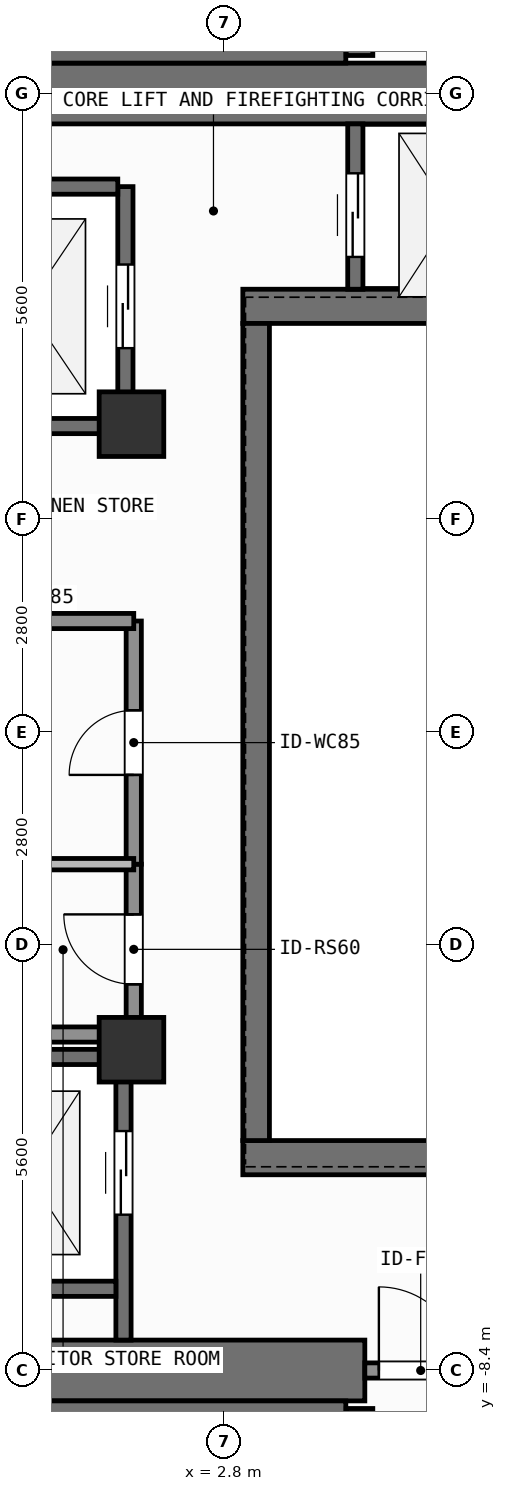
"""IFC4 building model, lengths in metres.
Left out: names, types, materials, properties, quantities, classifications, styles, units other than length and angle.
Written with IfcOpenShell. Run it as: python <this file> out.ifc"""

import sys

from ifc_helpers import new_model, si_unit, direction, frame, frame_2d, origin, origin_2d, place, context, subcontext, project, spatial, rectangle, extrude, element, fill, save


model = new_model("IFC4")
c1 = context("Model", 3, precision=1e-05, world=origin(), true_north=direction((0.0, 1.0)))
c2 = subcontext(c1, "Body", "Model", "MODEL_VIEW")
j1 = project(units=[si_unit("LENGTHUNIT", "METRE"), si_unit("PLANEANGLEUNIT", "RADIAN")], contexts=[c1])
p1 = place(None, origin())
s1 = spatial("IfcSite", under=j1, at=p1, CompositionType="ELEMENT")
p2 = place(p1, origin())
s2 = spatial("IfcBuilding", under=s1, at=p2, CompositionType="ELEMENT")
p3 = place(p2, frame((0.0, 0.0, 179.7)))
s3 = spatial("IfcBuildingStorey", under=s2, at=p3, CompositionType="ELEMENT", Elevation=179.7)
p4 = place(p3, frame((-2.62, -8.4, 0.0), z_axis=(0.0, 0.0, 1.0), x_axis=(1.0, 0.0, 0.0)))
e1 = element("IfcWall", 1, at=p4, inside=s3, PredefinedType="SHEAR", context=c2, shape_type="SweptSolid", body=[
    extrude(rectangle(XDim=7.27, YDim=0.8, at=frame_2d((3.635, 0.0))), origin(), (0.0, 0.0, 1.0), 3.9),
])
p5 = place(p3, frame((-7.55, 8.4, 0.0), z_axis=(0.0, 0.0, 1.0), x_axis=(1.0, 0.0, 0.0)))
e2 = element("IfcWall", 2, at=p5, inside=s3, PredefinedType="SHEAR", context=c2, shape_type="SweptSolid", body=[
    extrude(rectangle(XDim=16.35, YDim=0.8, at=frame_2d((8.175, 0.0))), origin(), (0.0, 0.0, 1.0), 3.9),
])
for number, where, z_axis, x_axis in (
    (3, (3.045, -5.6, 0.0), (0.0, 0.0, 1.0), (1.0, 0.0, 0.0)),
    (4, (3.045, 5.6, 0.0), (0.0, 0.0, 1.0), (1.0, 0.0, 0.0)),
):
    element("IfcWall", number, at=place(p3, frame(where, z_axis=z_axis, x_axis=x_axis)), inside=s3, PredefinedType="SHEAR", context=c2, shape_type="SweptSolid", body=[
        extrude(rectangle(XDim=5.755, YDim=0.45, at=frame_2d((2.877, 0.0))), origin(), (0.0, 0.0, 1.0), 3.9),
    ])
p6 = place(p3, frame((3.22, -5.375, 0.0), z_axis=(0.0, 0.0, 1.0), x_axis=(0.0, 1.0, 0.0)))
e5 = element("IfcWall", 5, at=p6, inside=s3, PredefinedType="SHEAR", context=c2, shape_type="SweptSolid", body=[
    extrude(rectangle(XDim=10.75, YDim=0.35, at=frame_2d((5.375, 0.0))), origin(), (0.0, 0.0, 1.0), 3.9),
])
p7 = place(p3, frame((-2.2, -8.913, 0.0), z_axis=(0.0, 0.0, 1.0), x_axis=(1.0, 0.0, 0.0)))
e6 = element("IfcWall", 6, at=p7, inside=s3, PredefinedType="SHEAR", context=c2, shape_type="SweptSolid", body=[
    extrude(rectangle(XDim=6.6, YDim=0.225, at=frame_2d((3.3, 0.0))), origin(), (0.0, 0.0, 1.0), 3.9),
])
p8 = place(p3, frame((4.58, -8.9, 0.0), z_axis=(0.0, 0.0, 1.0), x_axis=(0.0, -1.0, 0.0)))
e7 = element("IfcWall", 7, at=p8, inside=s3, PredefinedType="SHEAR", context=c2, shape_type="SweptSolid", body=[
    extrude(rectangle(XDim=2.925, YDim=0.35, at=frame_2d((1.462, 0.0))), origin(), (0.0, 0.0, 1.0), 3.9),
])
p9 = place(p8, frame((0.913, 0.0, 0.0)))
e8 = element("IfcOpeningElement", 8, at=p9, cuts=e7, PredefinedType="OPENING", context=c2, shape_type="SweptSolid", body=[
    extrude(rectangle(XDim=1.1, YDim=2.15, at=frame_2d((0.55, 1.075))), frame((0.0, 0.185, 0.0), z_axis=(0.0, -1.0, 0.0), x_axis=(1.0, 0.0, 0.0)), (0.0, 0.0, 1.0), 0.37),
])
p10 = place(p3, frame((-2.2, 8.913, 0.0), z_axis=(0.0, 0.0, 1.0), x_axis=(1.0, 0.0, 0.0)))
e9 = element("IfcWall", 9, at=p10, inside=s3, PredefinedType="SHEAR", context=c2, shape_type="SweptSolid", body=[
    extrude(rectangle(XDim=6.6, YDim=0.225, at=frame_2d((3.3, 0.0))), origin(), (0.0, 0.0, 1.0), 3.9),
])
p11 = place(p3, frame((4.58, 11.825, 0.0), z_axis=(0.0, 0.0, 1.0), x_axis=(0.0, -1.0, 0.0)))
e10 = element("IfcWall", 10, at=p11, inside=s3, PredefinedType="SHEAR", context=c2, shape_type="SweptSolid", body=[
    extrude(rectangle(XDim=2.925, YDim=0.35, at=frame_2d((1.462, 0.0))), origin(), (0.0, 0.0, 1.0), 3.9),
])
p12 = place(p11, frame((0.913, 0.0, 0.0)))
e11 = element("IfcOpeningElement", 11, at=p12, cuts=e10, PredefinedType="OPENING", context=c2, shape_type="SweptSolid", body=[
    extrude(rectangle(XDim=1.1, YDim=2.15, at=frame_2d((0.55, 1.075))), frame((0.0, 0.185, 0.0), z_axis=(0.0, -1.0, 0.0), x_axis=(1.0, 0.0, 0.0)), (0.0, 0.0, 1.0), 0.37),
])
for number, where, z_axis, x_axis in (
    (12, (1.58, -4.18, 0.0), (0.0, 0.0, 1.0), (1.0, 0.0, 0.0)),
    (13, (1.58, 4.05, 0.0), (0.0, 0.0, 1.0), (1.0, 0.0, 0.0)),
):
    element("IfcColumn", number, at=place(p3, frame(where, z_axis=z_axis, x_axis=x_axis)), inside=s3, PredefinedType="COLUMN", context=c2, shape_type="SweptSolid", body=[
        extrude(rectangle(XDim=0.85, YDim=0.85, at=origin_2d()), origin(), (0.0, 0.0, 1.0), 3.9),
    ])
p13 = place(p3, frame((1.5, 4.025, 0.0), z_axis=(0.0, 0.0, 1.0), x_axis=(0.0, 1.0, 0.0)))
e14 = element("IfcWall", 14, at=p13, inside=s3, PredefinedType="SHEAR", context=c2, shape_type="SweptSolid", body=[
    extrude(rectangle(XDim=3.15, YDim=0.2, at=frame_2d((1.575, 0.0))), origin(), (0.0, 0.0, 1.0), 3.68),
])
p14 = place(p13, frame((1.025, 0.0, 0.0)))
e15 = element("IfcOpeningElement", 15, at=p14, cuts=e14, PredefinedType="OPENING", context=c2, shape_type="SweptSolid", body=[
    extrude(rectangle(XDim=1.1, YDim=2.2, at=frame_2d((0.55, 1.1))), frame((0.0, 0.11, 0.0), z_axis=(0.0, -1.0, 0.0), x_axis=(1.0, 0.0, 0.0)), (0.0, 0.0, 1.0), 0.22),
])
for number, where, z_axis, x_axis in (
    (16, (-1.0, 4.025, 0.0), (0.0, 0.0, 1.0), (1.0, 0.0, 0.0)),
    (17, (-1.0, 7.175, 0.0), (0.0, 0.0, 1.0), (1.0, 0.0, 0.0)),
):
    element("IfcWall", number, at=place(p3, frame(where, z_axis=z_axis, x_axis=x_axis)), inside=s3, PredefinedType="SHEAR", context=c2, shape_type="SweptSolid", body=[
        extrude(rectangle(XDim=2.4, YDim=0.2, at=frame_2d((1.2, 0.0))), origin(), (0.0, 0.0, 1.0), 3.68),
    ])
p15 = place(p3, frame((1.475, -8.0, 0.0), z_axis=(0.0, 0.0, 1.0), x_axis=(0.0, 1.0, 0.0)))
e18 = element("IfcWall", 18, at=p15, inside=s3, PredefinedType="SHEAR", context=c2, shape_type="SweptSolid", body=[
    extrude(rectangle(XDim=3.725, YDim=0.2, at=frame_2d((1.863, 0.0))), origin(), (0.0, 0.0, 1.0), 3.68),
])
p16 = place(p15, frame((1.65, 0.0, 0.0)))
e19 = element("IfcOpeningElement", 19, at=p16, cuts=e18, PredefinedType="OPENING", context=c2, shape_type="SweptSolid", body=[
    extrude(rectangle(XDim=1.1, YDim=2.2, at=frame_2d((0.55, 1.1))), frame((0.0, 0.11, 0.0), z_axis=(0.0, -1.0, 0.0), x_axis=(1.0, 0.0, 0.0)), (0.0, 0.0, 1.0), 0.22),
])
for number, where, z_axis, x_axis in (
    (20, (-0.975, -7.325, 0.0), (0.0, 0.0, 1.0), (1.0, 0.0, 0.0)),
    (21, (-0.975, -4.275, 0.0), (0.0, 0.0, 1.0), (1.0, 0.0, 0.0)),
):
    element("IfcWall", number, at=place(p3, frame(where, z_axis=z_axis, x_axis=x_axis)), inside=s3, PredefinedType="SHEAR", context=c2, shape_type="SweptSolid", body=[
        extrude(rectangle(XDim=2.35, YDim=0.2, at=frame_2d((1.175, 0.0))), origin(), (0.0, 0.0, 1.0), 3.68),
    ])
p17 = place(p3, frame((4.525, 5.825, 0.0), z_axis=(0.0, 0.0, 1.0), x_axis=(0.0, 1.0, 0.0)))
e22 = element("IfcWall", 22, at=p17, inside=s3, PredefinedType="SHEAR", context=c2, shape_type="SweptSolid", body=[
    extrude(rectangle(XDim=2.175, YDim=0.2, at=frame_2d((1.087, 0.0))), origin(), (0.0, 0.0, 1.0), 3.68),
])
p18 = place(p17, frame((0.425, 0.0, 0.0)))
e23 = element("IfcOpeningElement", 23, at=p18, cuts=e22, PredefinedType="OPENING", context=c2, shape_type="SweptSolid", body=[
    extrude(rectangle(XDim=1.1, YDim=2.2, at=frame_2d((0.55, 1.1))), frame((0.0, 0.11, 0.0), z_axis=(0.0, -1.0, 0.0), x_axis=(1.0, 0.0, 0.0)), (0.0, 0.0, 1.0), 0.22),
])
p19 = place(p3, frame((4.65, -8.4, 0.0), z_axis=(0.0, 0.0, 1.0), x_axis=(1.0, 0.0, 0.0)))
e24 = element("IfcWall", 24, at=p19, inside=s3, PredefinedType="SOLIDWALL", context=c2, shape_type="SweptSolid", body=[
    extrude(rectangle(XDim=1.47, YDim=0.2, at=frame_2d((0.735, 0.0))), origin(), (0.0, 0.0, 1.0), 2.82),
])
p20 = place(p19, frame((0.185, 0.0, 0.0)))
e25 = element("IfcOpeningElement", 25, at=p20, cuts=e24, PredefinedType="OPENING", context=c2, shape_type="SweptSolid", body=[
    extrude(rectangle(XDim=1.1, YDim=2.15, at=frame_2d((0.55, 1.075))), frame((0.0, 0.11, 0.0), z_axis=(0.0, -1.0, 0.0), x_axis=(1.0, 0.0, 0.0)), (0.0, 0.0, 1.0), 0.22),
])
p21 = place(p3, frame((1.61, -3.98, 0.0), z_axis=(0.0, 0.0, 1.0), x_axis=(0.0, 1.0, 0.0)))
e26 = element("IfcWall", 26, at=p21, inside=s3, PredefinedType="SOLIDWALL", context=c2, shape_type="SweptSolid", body=[
    extrude(rectangle(XDim=2.241, YDim=0.2, at=frame_2d((1.121, 0.0))), origin(), (0.0, 0.0, 1.0), 3.68),
])
p22 = place(p21, frame((0.66, 0.0, 0.0)))
e27 = element("IfcOpeningElement", 27, at=p22, cuts=e26, PredefinedType="OPENING", context=c2, shape_type="SweptSolid", body=[
    extrude(rectangle(XDim=0.92, YDim=2.1, at=frame_2d((0.46, 1.05))), frame((0.0, 0.11, 0.0), z_axis=(0.0, -1.0, 0.0), x_axis=(1.0, 0.0, 0.0)), (0.0, 0.0, 1.0), 0.22),
])
p23 = place(p3, frame((1.61, -1.739, 0.0), z_axis=(0.0, 0.0, 1.0), x_axis=(0.0, 1.0, 0.0)))
e28 = element("IfcWall", 28, at=p23, inside=s3, PredefinedType="SOLIDWALL", context=c2, shape_type="SweptSolid", body=[
    extrude(rectangle(XDim=3.199, YDim=0.2, at=frame_2d((1.6, 0.0))), origin(), (0.0, 0.0, 1.0), 3.68),
])
p24 = place(p23, frame((1.175, 0.0, 0.0)))
e29 = element("IfcOpeningElement", 29, at=p24, cuts=e28, PredefinedType="OPENING", context=c2, shape_type="SweptSolid", body=[
    extrude(rectangle(XDim=0.85, YDim=2.1, at=frame_2d((0.425, 1.05))), frame((0.0, 0.11, 0.0), z_axis=(0.0, -1.0, 0.0), x_axis=(1.0, 0.0, 0.0)), (0.0, 0.0, 1.0), 0.22),
])
for number, where, z_axis, x_axis in (
    (30, (-1.58, -3.98, 0.0), (0.0, 0.0, 1.0), (1.0, 0.0, 0.0)),
    (31, (-1.58, 1.46, 0.0), (0.0, 0.0, 1.0), (1.0, 0.0, 0.0)),
):
    element("IfcWall", number, at=place(p3, frame(where, z_axis=z_axis, x_axis=x_axis)), inside=s3, PredefinedType="SOLIDWALL", context=c2, shape_type="SweptSolid", body=[
        extrude(rectangle(XDim=3.19, YDim=0.2, at=frame_2d((1.595, 0.0))), origin(), (0.0, 0.0, 1.0), 3.68),
    ])
p25 = place(p3, frame((-1.58, -1.739, 0.0), z_axis=(0.0, 0.0, 1.0), x_axis=(1.0, 0.0, 0.0)))
e32 = element("IfcWall", 32, at=p25, inside=s3, PredefinedType="PARTITIONING", context=c2, shape_type="SweptSolid", body=[
    extrude(rectangle(XDim=3.19, YDim=0.15, at=frame_2d((1.595, 0.0))), origin(), (0.0, 0.0, 1.0), 3.68),
])
p26 = place(p14, origin())
e33 = element("IfcDoor", 33, at=p26, inside=s3, OperationType="SLIDING_TO_LEFT", PredefinedType="DOOR", context=c2, shape_type="SweptSolid", body=[
    extrude(rectangle(XDim=1.1, YDim=2.2, at=frame_2d((0.55, 1.1))), frame((0.0, 0.025, 0.0), z_axis=(0.0, -1.0, 0.0), x_axis=(1.0, 0.0, 0.0)), (0.0, 0.0, 1.0), 0.05),
])
fill(e15, e33)
p27 = place(p16, origin())
e34 = element("IfcDoor", 34, at=p27, inside=s3, OperationType="SLIDING_TO_LEFT", PredefinedType="DOOR", context=c2, shape_type="SweptSolid", body=[
    extrude(rectangle(XDim=1.1, YDim=2.2, at=frame_2d((0.55, 1.1))), frame((0.0, 0.025, 0.0), z_axis=(0.0, -1.0, 0.0), x_axis=(1.0, 0.0, 0.0)), (0.0, 0.0, 1.0), 0.05),
])
fill(e19, e34)
p28 = place(p18, origin())
e35 = element("IfcDoor", 35, at=p28, inside=s3, OperationType="SLIDING_TO_LEFT", PredefinedType="DOOR", context=c2, shape_type="SweptSolid", body=[
    extrude(rectangle(XDim=1.1, YDim=2.2, at=frame_2d((0.55, 1.1))), frame((0.0, 0.025, 0.0), z_axis=(0.0, -1.0, 0.0), x_axis=(1.0, 0.0, 0.0)), (0.0, 0.0, 1.0), 0.05),
])
fill(e23, e35)
p29 = place(p20, origin())
e36 = element("IfcDoor", 36, at=p29, inside=s3, OperationType="SINGLE_SWING_LEFT", PredefinedType="DOOR", context=c2, shape_type="SweptSolid", body=[
    extrude(rectangle(XDim=1.1, YDim=2.15, at=frame_2d((0.55, 1.075))), frame((0.0, 0.025, 0.0), z_axis=(0.0, -1.0, 0.0), x_axis=(1.0, 0.0, 0.0)), (0.0, 0.0, 1.0), 0.05),
])
fill(e25, e36)
p30 = place(p22, origin())
e37 = element("IfcDoor", 37, at=p30, inside=s3, OperationType="SINGLE_SWING_RIGHT", PredefinedType="DOOR", context=c2, shape_type="SweptSolid", body=[
    extrude(rectangle(XDim=0.92, YDim=2.1, at=frame_2d((0.46, 1.05))), frame((0.0, 0.025, 0.0), z_axis=(0.0, -1.0, 0.0), x_axis=(1.0, 0.0, 0.0)), (0.0, 0.0, 1.0), 0.05),
])
fill(e27, e37)
p31 = place(p24, origin())
e38 = element("IfcDoor", 38, at=p31, inside=s3, OperationType="SINGLE_SWING_LEFT", PredefinedType="DOOR", context=c2, shape_type="SweptSolid", body=[
    extrude(rectangle(XDim=0.85, YDim=2.1, at=frame_2d((0.425, 1.05))), frame((0.0, 0.025, 0.0), z_axis=(0.0, -1.0, 0.0), x_axis=(1.0, 0.0, 0.0)), (0.0, 0.0, 1.0), 0.05),
])
fill(e29, e38)
save(model, sys.argv[1])
